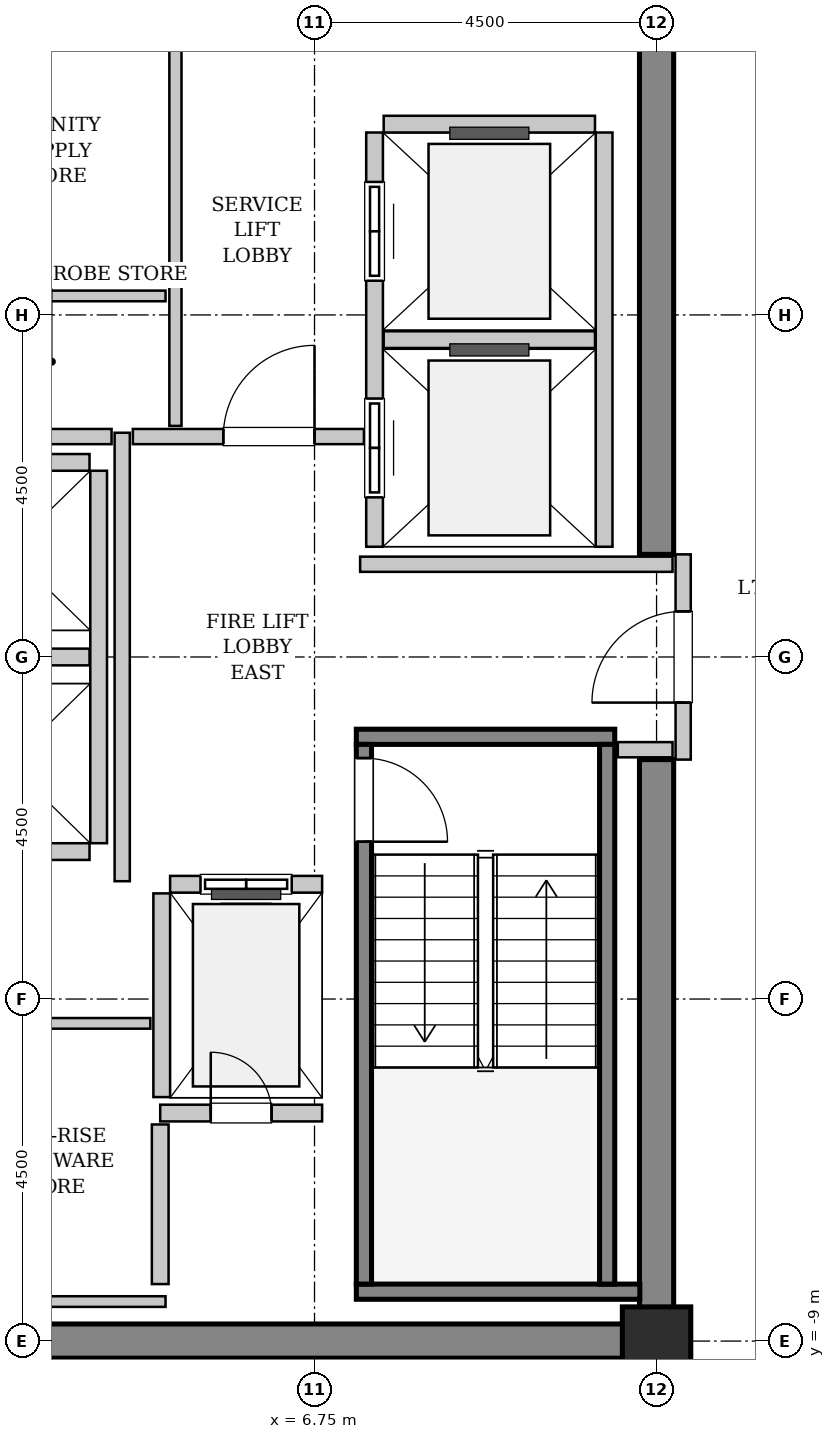
"""IFC4 building model, lengths in metres.
Left out: names, types, materials, properties, quantities, classifications, styles, units other than length and angle.
Written with IfcOpenShell. Run it as: python <this file> out.ifc"""

import sys

from ifc_helpers import new_model, si_unit, direction, frame, frame_2d, origin, origin_2d, place, context, subcontext, project, spatial, rectangle, extrude, source, transform, mapped, element, fill, save


model = new_model("IFC4")
c1 = context("Model", 3, precision=1e-05, world=origin(), true_north=direction((0.0, 1.0)))
c2 = subcontext(c1, "Body", "Model", "MODEL_VIEW")
j1 = project(units=[si_unit("LENGTHUNIT", "METRE"), si_unit("PLANEANGLEUNIT", "RADIAN")], contexts=[c1])
p1 = place(None, origin())
s1 = spatial("IfcSite", under=j1, at=p1, CompositionType="ELEMENT")
p2 = place(p1, origin())
s2 = spatial("IfcBuilding", under=s1, at=p2, CompositionType="ELEMENT")
p3 = place(p2, frame((0.0, 0.0, 314.0)))
s3 = spatial("IfcBuildingStorey", under=s2, at=p3, CompositionType="ELEMENT", Elevation=314.0)
m1 = source(origin(), c2, "Body", "SweptSolid", [
    extrude(rectangle(XDim=9.925, YDim=0.45, at=frame_2d((4.962, 0.0))), origin(), (0.0, 0.0, 1.0), 3.8),
])
p4 = place(p3, frame((1.55, -9.0, 0.0), z_axis=(0.0, 0.0, 1.0), x_axis=(1.0, 0.0, 0.0)))
e1 = element("IfcWall", 1, at=p4, inside=s3, PredefinedType="SHEAR", context=c2, shape_type="MappedRepresentation", body=[
    mapped(m1, transform((0.0, 0.0, 0.0), x_axis=(1.0, 0.0, 0.0), y_axis=(0.0, 1.0, 0.0), z_axis=(0.0, 0.0, 1.0), scale=1.0)),
])
m2 = source(origin(), c2, "Body", "SweptSolid", [
    extrude(rectangle(XDim=7.425, YDim=0.45, at=frame_2d((3.712, 0.0))), origin(), (0.0, 0.0, 1.0), 3.8),
])
for number, where, z_axis, x_axis in (
    (2, (11.25, -8.775, 0.0), (0.0, 0.0, 1.0), (0.0, 1.0, 0.0)),
    (3, (11.25, 1.35, 0.0), (0.0, 0.0, 1.0), (0.0, 1.0, 0.0)),
):
    element("IfcWall", number, at=place(p3, frame(where, z_axis=z_axis, x_axis=x_axis)), inside=s3, PredefinedType="SHEAR", context=c2, shape_type="MappedRepresentation", body=[
        mapped(m2, transform((0.0, 0.0, 0.0), x_axis=(1.0, 0.0, 0.0), y_axis=(0.0, 1.0, 0.0), z_axis=(0.0, 0.0, 1.0), scale=1.0)),
    ])
m3 = source(origin(), c2, "Body", "SweptSolid", [
    extrude(rectangle(XDim=0.9, YDim=0.9, at=origin_2d()), origin(), (0.0, 0.0, 1.0), 3.8),
])
p5 = place(p3, frame((11.25, -9.0, 0.0), z_axis=(0.0, 0.0, 1.0), x_axis=(1.0, 0.0, 0.0)))
e4 = element("IfcColumn", 4, at=p5, inside=s3, PredefinedType="COLUMN", context=c2, shape_type="MappedRepresentation", body=[
    mapped(m3, transform((0.0, 0.0, 0.0), x_axis=(1.0, 0.0, 0.0), y_axis=(0.0, 1.0, 0.0), z_axis=(0.0, 0.0, 1.0), scale=1.0)),
])
m4 = source(origin(), c2, "Body", "SweptSolid", [
    extrude(rectangle(XDim=3.4, YDim=0.2, at=frame_2d((1.7, 0.0))), origin(), (0.0, 0.0, 1.0), 3.8),
])
p6 = place(p3, frame((7.3, -1.05, 0.0), z_axis=(0.0, 0.0, 1.0), x_axis=(1.0, 0.0, 0.0)))
e5 = element("IfcWall", 5, at=p6, inside=s3, PredefinedType="SOLIDWALL", context=c2, shape_type="MappedRepresentation", body=[
    mapped(m4, transform((0.0, 0.0, 0.0), x_axis=(1.0, 0.0, 0.0), y_axis=(0.0, 1.0, 0.0), z_axis=(0.0, 0.0, 1.0), scale=1.0)),
])
m5 = source(origin(), c2, "Body", "SweptSolid", [
    extrude(rectangle(XDim=3.73, YDim=0.2, at=frame_2d((1.865, 0.0))), origin(), (0.0, 0.0, 1.0), 3.8),
])
p7 = place(p3, frame((7.3, -8.35, 0.0), z_axis=(0.0, 0.0, 1.0), x_axis=(1.0, 0.0, 0.0)))
e6 = element("IfcWall", 6, at=p7, inside=s3, PredefinedType="SOLIDWALL", context=c2, shape_type="MappedRepresentation", body=[
    mapped(m5, transform((0.0, 0.0, 0.0), x_axis=(1.0, 0.0, 0.0), y_axis=(0.0, 1.0, 0.0), z_axis=(0.0, 0.0, 1.0), scale=1.0)),
])
m6 = source(origin(), c2, "Body", "SweptSolid", [
    extrude(rectangle(XDim=7.1, YDim=0.2, at=frame_2d((3.55, 0.0))), origin(), (0.0, 0.0, 1.0), 3.8),
])
p8 = place(p3, frame((7.4, -1.15, 0.0), z_axis=(0.0, 0.0, 1.0), x_axis=(0.0, -1.0, 0.0)))
e7 = element("IfcWall", 7, at=p8, inside=s3, PredefinedType="SOLIDWALL", context=c2, shape_type="MappedRepresentation", body=[
    mapped(m6, transform((0.0, 0.0, 0.0), x_axis=(1.0, 0.0, 0.0), y_axis=(0.0, 1.0, 0.0), z_axis=(0.0, 0.0, 1.0), scale=1.0)),
])
p9 = place(p8, frame((0.18, 0.0, 0.0)))
e8 = element("IfcOpeningElement", 8, at=p9, cuts=e7, PredefinedType="OPENING", context=c2, shape_type="SweptSolid", body=[
    extrude(rectangle(XDim=1.1, YDim=2.15, at=frame_2d((0.55, 1.075))), frame((0.0, 0.11, 0.0), z_axis=(0.0, -1.0, 0.0), x_axis=(1.0, 0.0, 0.0)), (0.0, 0.0, 1.0), 0.22),
])
p10 = place(p3, frame((10.6, -1.15, 0.0), z_axis=(0.0, 0.0, 1.0), x_axis=(0.0, -1.0, 0.0)))
e9 = element("IfcWall", 9, at=p10, inside=s3, PredefinedType="SOLIDWALL", context=c2, shape_type="MappedRepresentation", body=[
    mapped(m6, transform((0.0, 0.0, 0.0), x_axis=(1.0, 0.0, 0.0), y_axis=(0.0, 1.0, 0.0), z_axis=(0.0, 0.0, 1.0), scale=1.0)),
])
m7 = source(origin(), c2, "Body", "SweptSolid", [
    extrude(rectangle(XDim=2.0, YDim=0.22, at=frame_2d((1.0, 0.0))), origin(), (0.0, 0.0, 1.0), 3.485),
])
p11 = place(p3, frame((6.85, -2.99, 0.0), z_axis=(0.0, 0.0, 1.0), x_axis=(-1.0, 0.0, 0.0)))
e10 = element("IfcWall", 10, at=p11, inside=s3, PredefinedType="SOLIDWALL", context=c2, shape_type="MappedRepresentation", body=[
    mapped(m7, transform((0.0, 0.0, 0.0), x_axis=(1.0, 0.0, 0.0), y_axis=(0.0, 1.0, 0.0), z_axis=(0.0, 0.0, 1.0), scale=1.0)),
])
p12 = place(p11, frame((0.4, 0.0, 0.0)))
e11 = element("IfcOpeningElement", 11, at=p12, cuts=e10, PredefinedType="OPENING", context=c2, shape_type="SweptSolid", body=[
    extrude(rectangle(XDim=1.2, YDim=2.2, at=frame_2d((0.6, 1.1))), frame((0.0, 0.12, 0.0), z_axis=(0.0, -1.0, 0.0), x_axis=(1.0, 0.0, 0.0)), (0.0, 0.0, 1.0), 0.24),
])
m8 = source(origin(), c2, "Body", "SweptSolid", [
    extrude(rectangle(XDim=2.68, YDim=0.22, at=frame_2d((1.34, 0.0))), origin(), (0.0, 0.0, 1.0), 3.485),
])
p13 = place(p3, frame((4.74, -3.11, 0.0), z_axis=(0.0, 0.0, 1.0), x_axis=(0.0, -1.0, 0.0)))
e12 = element("IfcWall", 12, at=p13, inside=s3, PredefinedType="SOLIDWALL", context=c2, shape_type="MappedRepresentation", body=[
    mapped(m8, transform((0.0, 0.0, 0.0), x_axis=(1.0, 0.0, 0.0), y_axis=(0.0, 1.0, 0.0), z_axis=(0.0, 0.0, 1.0), scale=1.0)),
])
m9 = source(origin(), c2, "Body", "SweptSolid", [
    extrude(rectangle(XDim=5.45, YDim=0.22, at=frame_2d((2.725, 0.0))), origin(), (0.0, 0.0, 1.0), 3.485),
])
p14 = place(p3, frame((7.54, 6.9, 0.0), z_axis=(0.0, 0.0, 1.0), x_axis=(0.0, -1.0, 0.0)))
e13 = element("IfcWall", 13, at=p14, inside=s3, PredefinedType="SOLIDWALL", context=c2, shape_type="MappedRepresentation", body=[
    mapped(m9, transform((0.0, 0.0, 0.0), x_axis=(1.0, 0.0, 0.0), y_axis=(0.0, 1.0, 0.0), z_axis=(0.0, 0.0, 1.0), scale=1.0)),
])
p15 = place(p14, frame((3.5, 0.0, 0.0)))
e14 = element("IfcOpeningElement", 14, at=p15, cuts=e13, PredefinedType="OPENING", context=c2, shape_type="SweptSolid", body=[
    extrude(rectangle(XDim=1.3, YDim=2.3, at=frame_2d((0.65, 1.15))), frame((0.0, 0.12, 0.0), z_axis=(0.0, -1.0, 0.0), x_axis=(1.0, 0.0, 0.0)), (0.0, 0.0, 1.0), 0.24),
])
p16 = place(p14, frame((0.65, 0.0, 0.0)))
e15 = element("IfcOpeningElement", 15, at=p16, cuts=e13, PredefinedType="OPENING", context=c2, shape_type="SweptSolid", body=[
    extrude(rectangle(XDim=1.3, YDim=2.3, at=frame_2d((0.65, 1.15))), frame((0.0, 0.12, 0.0), z_axis=(0.0, -1.0, 0.0), x_axis=(1.0, 0.0, 0.0)), (0.0, 0.0, 1.0), 0.24),
])
p17 = place(p3, frame((10.56, 1.45, 0.0), z_axis=(0.0, 0.0, 1.0), x_axis=(0.0, 1.0, 0.0)))
e16 = element("IfcWall", 16, at=p17, inside=s3, PredefinedType="SOLIDWALL", context=c2, shape_type="MappedRepresentation", body=[
    mapped(m9, transform((0.0, 0.0, 0.0), x_axis=(1.0, 0.0, 0.0), y_axis=(0.0, 1.0, 0.0), z_axis=(0.0, 0.0, 1.0), scale=1.0)),
])
m10 = source(origin(), c2, "Body", "SweptSolid", [
    extrude(rectangle(XDim=2.78, YDim=0.22, at=frame_2d((1.39, 0.0))), origin(), (0.0, 0.0, 1.0), 3.485),
])
for number, where, z_axis, x_axis in (
    (17, (7.66, 4.175, 0.0), (0.0, 0.0, 1.0), (1.0, 0.0, 0.0)),
    (18, (10.44, 7.01, 0.0), (0.0, 0.0, 1.0), (-1.0, 0.0, 0.0)),
):
    element("IfcWall", number, at=place(p3, frame(where, z_axis=z_axis, x_axis=x_axis)), inside=s3, PredefinedType="SOLIDWALL", context=c2, shape_type="MappedRepresentation", body=[
        mapped(m10, transform((0.0, 0.0, 0.0), x_axis=(1.0, 0.0, 0.0), y_axis=(0.0, 1.0, 0.0), z_axis=(0.0, 0.0, 1.0), scale=1.0)),
    ])
m11 = source(origin(), c2, "Body", "SweptSolid", [
    extrude(rectangle(XDim=4.9, YDim=0.22, at=frame_2d((2.45, 0.0))), origin(), (0.0, 0.0, 1.0), 3.485),
])
p18 = place(p3, frame((3.91, -2.45, 0.0), z_axis=(0.0, 0.0, 1.0), x_axis=(0.0, 1.0, 0.0)))
e19 = element("IfcWall", 19, at=p18, inside=s3, PredefinedType="SOLIDWALL", context=c2, shape_type="MappedRepresentation", body=[
    mapped(m11, transform((0.0, 0.0, 0.0), x_axis=(1.0, 0.0, 0.0), y_axis=(0.0, 1.0, 0.0), z_axis=(0.0, 0.0, 1.0), scale=1.0)),
])
m12 = source(origin(), c2, "Body", "SweptSolid", [
    extrude(rectangle(XDim=2.13, YDim=0.22, at=frame_2d((1.065, 0.0))), origin(), (0.0, 0.0, 1.0), 3.485),
])
for number, where, z_axis, x_axis in (
    (20, (1.66, -2.56, 0.0), (0.0, 0.0, 1.0), (1.0, 0.0, 0.0)),
    (21, (1.66, 0.0, 0.0), (0.0, 0.0, 1.0), (1.0, 0.0, 0.0)),
    (22, (3.79, 2.56, 0.0), (0.0, 0.0, 1.0), (-1.0, 0.0, 0.0)),
):
    element("IfcWall", number, at=place(p3, frame(where, z_axis=z_axis, x_axis=x_axis)), inside=s3, PredefinedType="SOLIDWALL", context=c2, shape_type="MappedRepresentation", body=[
        mapped(m12, transform((0.0, 0.0, 0.0), x_axis=(1.0, 0.0, 0.0), y_axis=(0.0, 1.0, 0.0), z_axis=(0.0, 0.0, 1.0), scale=1.0)),
    ])
p19 = place(p3, frame((4.72, -6.0, 0.0), z_axis=(0.0, 0.0, 1.0), x_axis=(1.0, 0.0, 0.0)))
e23 = element("IfcWall", 23, at=p19, inside=s3, PredefinedType="SOLIDWALL", context=c2, shape_type="MappedRepresentation", body=[
    mapped(m12, transform((0.0, 0.0, 0.0), x_axis=(1.0, 0.0, 0.0), y_axis=(0.0, 1.0, 0.0), z_axis=(0.0, 0.0, 1.0), scale=1.0)),
])
p20 = place(p19, frame((0.665, 0.0, 0.0)))
e24 = element("IfcOpeningElement", 24, at=p20, cuts=e23, PredefinedType="OPENING", context=c2, shape_type="SweptSolid", body=[
    extrude(rectangle(XDim=0.8, YDim=2.0, at=frame_2d((0.4, 1.0))), frame((0.0, 0.12, 0.0), z_axis=(0.0, -1.0, 0.0), x_axis=(1.0, 0.0, 0.0)), (0.0, 0.0, 1.0), 0.24),
])
m13 = source(origin(), c2, "Body", "SweptSolid", [
    extrude(rectangle(XDim=2.1, YDim=0.22, at=frame_2d((1.05, 0.0))), origin(), (0.0, 0.0, 1.0), 3.485),
])
p21 = place(p3, frame((4.72, -8.25, 0.0), z_axis=(0.0, 0.0, 1.0), x_axis=(0.0, 1.0, 0.0)))
e25 = element("IfcWall", 25, at=p21, inside=s3, PredefinedType="SOLIDWALL", context=c2, shape_type="MappedRepresentation", body=[
    mapped(m13, transform((0.0, 0.0, 0.0), x_axis=(1.0, 0.0, 0.0), y_axis=(0.0, 1.0, 0.0), z_axis=(0.0, 0.0, 1.0), scale=1.0)),
])
m14 = source(origin(), c2, "Body", "SweptSolid", [
    extrude(rectangle(XDim=2.7, YDim=0.2, at=frame_2d((1.35, 0.0))), origin(), (0.0, 0.0, 1.0), 2.575),
])
p22 = place(p3, frame((11.6, -1.35, 0.0), z_axis=(0.0, 0.0, 1.0), x_axis=(0.0, 1.0, 0.0)))
e26 = element("IfcWall", 26, at=p22, inside=s3, PredefinedType="PARTITIONING", context=c2, shape_type="MappedRepresentation", body=[
    mapped(m14, transform((0.0, 0.0, 0.0), x_axis=(1.0, 0.0, 0.0), y_axis=(0.0, 1.0, 0.0), z_axis=(0.0, 0.0, 1.0), scale=1.0)),
])
p23 = place(p22, frame((0.75, 0.0, 0.0)))
e27 = element("IfcOpeningElement", 27, at=p23, cuts=e26, PredefinedType="OPENING", context=c2, shape_type="SweptSolid", body=[
    extrude(rectangle(XDim=1.2, YDim=2.15, at=frame_2d((0.6, 1.075))), frame((0.0, 0.11, 0.0), z_axis=(0.0, -1.0, 0.0), x_axis=(1.0, 0.0, 0.0)), (0.0, 0.0, 1.0), 0.22),
])
m15 = source(origin(), c2, "Body", "SweptSolid", [
    extrude(rectangle(XDim=5.9, YDim=0.2, at=frame_2d((2.95, 0.0))), origin(), (0.0, 0.0, 1.0), 3.485),
])
p24 = place(p3, frame((4.22, -2.95, 0.0), z_axis=(0.0, 0.0, 1.0), x_axis=(0.0, 1.0, 0.0)))
e28 = element("IfcWall", 28, at=p24, inside=s3, PredefinedType="PARTITIONING", context=c2, shape_type="MappedRepresentation", body=[
    mapped(m15, transform((0.0, 0.0, 0.0), x_axis=(1.0, 0.0, 0.0), y_axis=(0.0, 1.0, 0.0), z_axis=(0.0, 0.0, 1.0), scale=1.0)),
])
m16 = source(origin(), c2, "Body", "SweptSolid", [
    extrude(rectangle(XDim=2.52, YDim=0.2, at=frame_2d((1.26, 0.0))), origin(), (0.0, 0.0, 1.0), 3.485),
])
p25 = place(p3, frame((1.56, 2.9, 0.0), z_axis=(0.0, 0.0, 1.0), x_axis=(1.0, 0.0, 0.0)))
e29 = element("IfcWall", 29, at=p25, inside=s3, PredefinedType="PARTITIONING", context=c2, shape_type="MappedRepresentation", body=[
    mapped(m16, transform((0.0, 0.0, 0.0), x_axis=(1.0, 0.0, 0.0), y_axis=(0.0, 1.0, 0.0), z_axis=(0.0, 0.0, 1.0), scale=1.0)),
])
m17 = source(origin(), c2, "Body", "SweptSolid", [
    extrude(rectangle(XDim=3.04, YDim=0.2, at=frame_2d((1.52, 0.0))), origin(), (0.0, 0.0, 1.0), 3.485),
])
p26 = place(p3, frame((4.36, 2.9, 0.0), z_axis=(0.0, 0.0, 1.0), x_axis=(1.0, 0.0, 0.0)))
e30 = element("IfcWall", 30, at=p26, inside=s3, PredefinedType="PARTITIONING", context=c2, shape_type="MappedRepresentation", body=[
    mapped(m17, transform((0.0, 0.0, 0.0), x_axis=(1.0, 0.0, 0.0), y_axis=(0.0, 1.0, 0.0), z_axis=(0.0, 0.0, 1.0), scale=1.0)),
])
p27 = place(p26, frame((1.19, 0.0, 0.0)))
e31 = element("IfcOpeningElement", 31, at=p27, cuts=e30, PredefinedType="OPENING", context=c2, shape_type="SweptSolid", body=[
    extrude(rectangle(XDim=1.2, YDim=2.15, at=frame_2d((0.6, 1.075))), frame((0.0, 0.11, 0.0), z_axis=(0.0, -1.0, 0.0), x_axis=(1.0, 0.0, 0.0)), (0.0, 0.0, 1.0), 0.22),
])
m18 = source(origin(), c2, "Body", "SweptSolid", [
    extrude(rectangle(XDim=4.11, YDim=0.2, at=frame_2d((2.055, 0.0))), origin(), (0.0, 0.0, 1.0), 3.485),
])
p28 = place(p3, frame((7.35, 1.22, 0.0), z_axis=(0.0, 0.0, 1.0), x_axis=(1.0, 0.0, 0.0)))
e32 = element("IfcWall", 32, at=p28, inside=s3, PredefinedType="PARTITIONING", context=c2, shape_type="MappedRepresentation", body=[
    mapped(m18, transform((0.0, 0.0, 0.0), x_axis=(1.0, 0.0, 0.0), y_axis=(0.0, 1.0, 0.0), z_axis=(0.0, 0.0, 1.0), scale=1.0)),
])
m19 = source(origin(), c2, "Body", "SweptSolid", [
    extrude(rectangle(XDim=0.72, YDim=0.2, at=frame_2d((0.36, 0.0))), origin(), (0.0, 0.0, 1.0), 3.485),
])
p29 = place(p3, frame((10.74, -1.22, 0.0), z_axis=(0.0, 0.0, 1.0), x_axis=(1.0, 0.0, 0.0)))
e33 = element("IfcWall", 33, at=p29, inside=s3, PredefinedType="PARTITIONING", context=c2, shape_type="MappedRepresentation", body=[
    mapped(m19, transform((0.0, 0.0, 0.0), x_axis=(1.0, 0.0, 0.0), y_axis=(0.0, 1.0, 0.0), z_axis=(0.0, 0.0, 1.0), scale=1.0)),
])
m20 = source(origin(), c2, "Body", "SweptSolid", [
    extrude(rectangle(XDim=5.45, YDim=0.16, at=frame_2d((2.725, 0.0))), origin(), (0.0, 0.0, 1.0), 3.485),
])
p30 = place(p3, frame((4.92, 3.04, 0.0), z_axis=(0.0, 0.0, 1.0), x_axis=(0.0, 1.0, 0.0)))
e34 = element("IfcWall", 34, at=p30, inside=s3, PredefinedType="PARTITIONING", context=c2, shape_type="MappedRepresentation", body=[
    mapped(m20, transform((0.0, 0.0, 0.0), x_axis=(1.0, 0.0, 0.0), y_axis=(0.0, 1.0, 0.0), z_axis=(0.0, 0.0, 1.0), scale=1.0)),
])
m21 = source(origin(), c2, "Body", "SweptSolid", [
    extrude(rectangle(XDim=3.15, YDim=0.14, at=frame_2d((1.575, 0.0))), origin(), (0.0, 0.0, 1.0), 3.485),
])
p31 = place(p3, frame((1.64, 4.75, 0.0), z_axis=(0.0, 0.0, 1.0), x_axis=(1.0, 0.0, 0.0)))
e35 = element("IfcWall", 35, at=p31, inside=s3, PredefinedType="PARTITIONING", context=c2, shape_type="MappedRepresentation", body=[
    mapped(m21, transform((0.0, 0.0, 0.0), x_axis=(1.0, 0.0, 0.0), y_axis=(0.0, 1.0, 0.0), z_axis=(0.0, 0.0, 1.0), scale=1.0)),
])
m22 = source(origin(), c2, "Body", "SweptSolid", [
    extrude(rectangle(XDim=2.95, YDim=0.14, at=frame_2d((1.475, 0.0))), origin(), (0.0, 0.0, 1.0), 3.485),
])
p32 = place(p3, frame((1.64, -4.82, 0.0), z_axis=(0.0, 0.0, 1.0), x_axis=(1.0, 0.0, 0.0)))
e36 = element("IfcWall", 36, at=p32, inside=s3, PredefinedType="PARTITIONING", context=c2, shape_type="MappedRepresentation", body=[
    mapped(m22, transform((0.0, 0.0, 0.0), x_axis=(1.0, 0.0, 0.0), y_axis=(0.0, 1.0, 0.0), z_axis=(0.0, 0.0, 1.0), scale=1.0)),
])
p33 = place(p3, frame((1.64, -8.48, 0.0), z_axis=(0.0, 0.0, 1.0), x_axis=(1.0, 0.0, 0.0)))
e37 = element("IfcWall", 37, at=p33, inside=s3, PredefinedType="PARTITIONING", context=c2, shape_type="MappedRepresentation", body=[
    mapped(m21, transform((0.0, 0.0, 0.0), x_axis=(1.0, 0.0, 0.0), y_axis=(0.0, 1.0, 0.0), z_axis=(0.0, 0.0, 1.0), scale=1.0)),
])
m23 = source(origin(), c2, "Body", "SweptSolid", [
    extrude(rectangle(XDim=1.1, YDim=2.15, at=frame_2d((0.55, 1.075))), frame((0.0, 0.025, 0.0), z_axis=(0.0, -1.0, 0.0), x_axis=(1.0, 0.0, 0.0)), (0.0, 0.0, 1.0), 0.05),
])
p34 = place(p9, origin())
e38 = element("IfcDoor", 38, at=p34, inside=s3, OperationType="SINGLE_SWING_RIGHT", PredefinedType="DOOR", context=c2, shape_type="MappedRepresentation", body=[
    mapped(m23, transform((0.0, 0.0, 0.0), x_axis=(1.0, 0.0, 0.0), y_axis=(0.0, 1.0, 0.0), z_axis=(0.0, 0.0, 1.0), scale=1.0)),
])
fill(e8, e38)
m24 = source(origin(), c2, "Body", "SweptSolid", [
    extrude(rectangle(XDim=1.2, YDim=2.2, at=frame_2d((0.6, 1.1))), frame((0.0, 0.025, 0.0), z_axis=(0.0, -1.0, 0.0), x_axis=(1.0, 0.0, 0.0)), (0.0, 0.0, 1.0), 0.05),
])
p35 = place(p12, origin())
e39 = element("IfcDoor", 39, at=p35, inside=s3, OperationType="SLIDING_TO_LEFT", PredefinedType="DOOR", context=c2, shape_type="MappedRepresentation", body=[
    mapped(m24, transform((0.0, 0.0, 0.0), x_axis=(1.0, 0.0, 0.0), y_axis=(0.0, 1.0, 0.0), z_axis=(0.0, 0.0, 1.0), scale=1.0)),
])
fill(e11, e39)
m25 = source(origin(), c2, "Body", "SweptSolid", [
    extrude(rectangle(XDim=1.3, YDim=2.3, at=frame_2d((0.65, 1.15))), frame((0.0, 0.025, 0.0), z_axis=(0.0, -1.0, 0.0), x_axis=(1.0, 0.0, 0.0)), (0.0, 0.0, 1.0), 0.05),
])
p36 = place(p15, origin())
e40 = element("IfcDoor", 40, at=p36, inside=s3, OperationType="SLIDING_TO_RIGHT", PredefinedType="DOOR", context=c2, shape_type="MappedRepresentation", body=[
    mapped(m25, transform((0.0, 0.0, 0.0), x_axis=(1.0, 0.0, 0.0), y_axis=(0.0, 1.0, 0.0), z_axis=(0.0, 0.0, 1.0), scale=1.0)),
])
fill(e14, e40)
p37 = place(p16, origin())
e41 = element("IfcDoor", 41, at=p37, inside=s3, OperationType="SLIDING_TO_RIGHT", PredefinedType="DOOR", context=c2, shape_type="MappedRepresentation", body=[
    mapped(m25, transform((0.0, 0.0, 0.0), x_axis=(1.0, 0.0, 0.0), y_axis=(0.0, 1.0, 0.0), z_axis=(0.0, 0.0, 1.0), scale=1.0)),
])
fill(e15, e41)
m26 = source(origin(), c2, "Body", "SweptSolid", [
    extrude(rectangle(XDim=0.8, YDim=2.0, at=frame_2d((0.4, 1.0))), frame((0.0, 0.025, 0.0), z_axis=(0.0, -1.0, 0.0), x_axis=(1.0, 0.0, 0.0)), (0.0, 0.0, 1.0), 0.05),
])
p38 = place(p20, origin())
e42 = element("IfcDoor", 42, at=p38, inside=s3, OperationType="SINGLE_SWING_LEFT", PredefinedType="TRAPDOOR", context=c2, shape_type="MappedRepresentation", body=[
    mapped(m26, transform((0.0, 0.0, 0.0), x_axis=(1.0, 0.0, 0.0), y_axis=(0.0, 1.0, 0.0), z_axis=(0.0, 0.0, 1.0), scale=1.0)),
])
fill(e24, e42)
m27 = source(origin(), c2, "Body", "SweptSolid", [
    extrude(rectangle(XDim=1.2, YDim=2.15, at=frame_2d((0.6, 1.075))), frame((0.0, 0.025, 0.0), z_axis=(0.0, -1.0, 0.0), x_axis=(1.0, 0.0, 0.0)), (0.0, 0.0, 1.0), 0.05),
])
p39 = place(p23, origin())
e43 = element("IfcDoor", 43, at=p39, inside=s3, OperationType="SINGLE_SWING_LEFT", PredefinedType="DOOR", context=c2, shape_type="MappedRepresentation", body=[
    mapped(m27, transform((0.0, 0.0, 0.0), x_axis=(1.0, 0.0, 0.0), y_axis=(0.0, 1.0, 0.0), z_axis=(0.0, 0.0, 1.0), scale=1.0)),
])
fill(e27, e43)
p40 = place(p27, origin())
e44 = element("IfcDoor", 44, at=p40, inside=s3, OperationType="SINGLE_SWING_RIGHT", PredefinedType="DOOR", context=c2, shape_type="MappedRepresentation", body=[
    mapped(m27, transform((0.0, 0.0, 0.0), x_axis=(1.0, 0.0, 0.0), y_axis=(0.0, 1.0, 0.0), z_axis=(0.0, 0.0, 1.0), scale=1.0)),
])
fill(e31, e44)
save(model, sys.argv[1])
